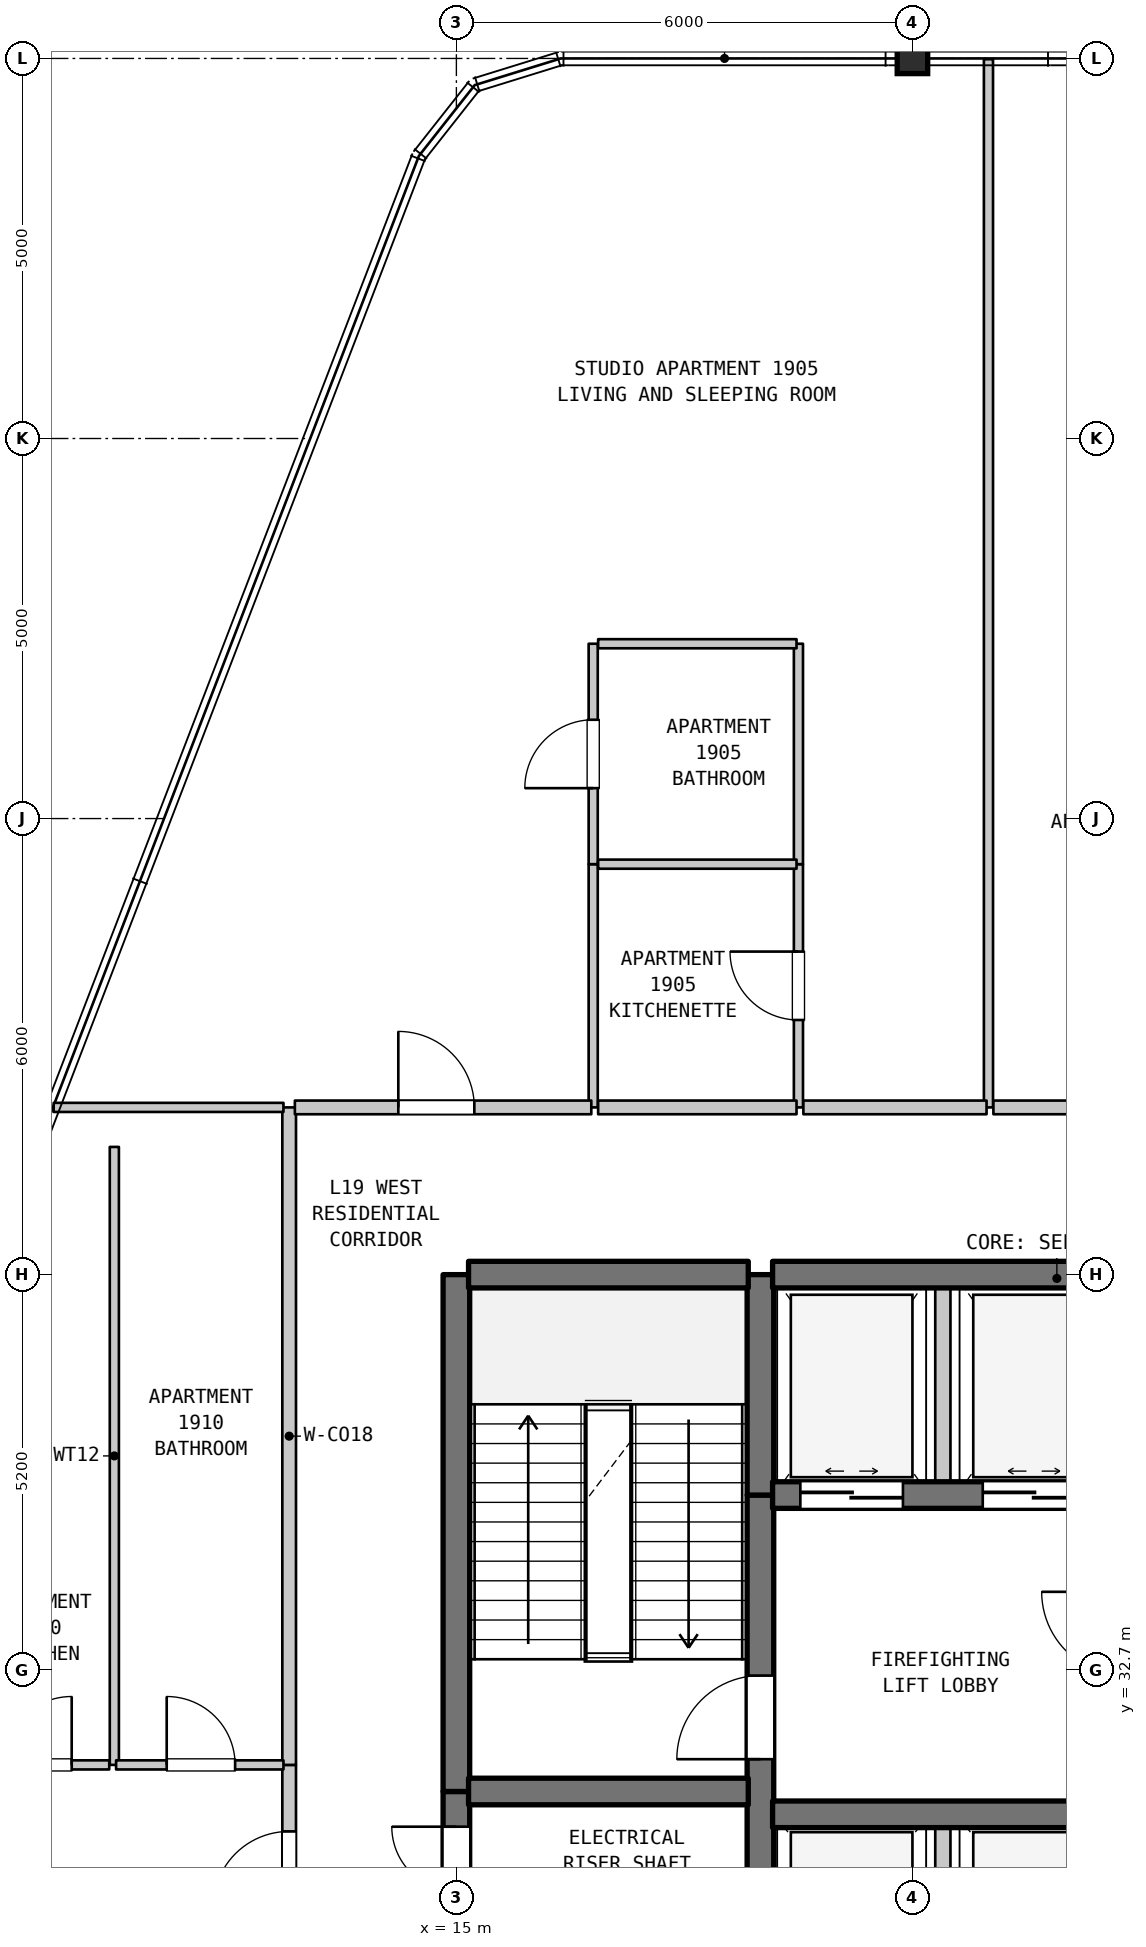
"""IFC4 building model, lengths in metres.
Left out: names, types, materials, properties, quantities, classifications, styles, units other than length and angle.
Written with IfcOpenShell. Run it as: python <this file> out.ifc"""

import sys

from ifc_helpers import new_model, si_unit, direction, frame, frame_2d, origin, origin_2d, place, context, subcontext, project, spatial, rectangle, i_section, extrude, element, fill, save


model = new_model("IFC4")
c1 = context("Model", 3, precision=1e-05, world=origin(), true_north=direction((0.0, 1.0)))
c2 = subcontext(c1, "Body", "Model", "MODEL_VIEW")
j1 = project(units=[si_unit("LENGTHUNIT", "METRE"), si_unit("PLANEANGLEUNIT", "RADIAN")], contexts=[c1])
p1 = place(None, origin())
s1 = spatial("IfcSite", under=j1, at=p1, CompositionType="ELEMENT")
p2 = place(p1, origin())
s2 = spatial("IfcBuilding", under=s1, at=p2, CompositionType="ELEMENT")
p3 = place(p2, frame((0.0, 0.0, 81.2)))
s3 = spatial("IfcBuildingStorey", under=s2, at=p3, CompositionType="ELEMENT", Elevation=81.2)
p4 = place(p3, frame((21.0, 53.9, 0.0), z_axis=(0.0, 0.0, 1.0), x_axis=(1.0, 0.0, 0.0)))
e1 = element("IfcColumn", 1, at=p4, inside=s3, PredefinedType="COLUMN", context=c2, shape_type="SweptSolid", body=[
    extrude(i_section(OverallWidth=0.401, OverallDepth=0.399, WebThickness=0.025, FlangeThickness=0.04, FilletRadius=0.015, at=origin_2d()), origin(), (0.0, 0.0, 1.0), 5.2),
])
p5 = place(p3, frame((10.5, 31.45, 0.0), z_axis=(0.0, 0.0, 1.0), x_axis=(0.0, 1.0, 0.0)))
e2 = element("IfcWall", 2, at=p5, inside=s3, PredefinedType="PARTITIONING", context=c2, shape_type="SweptSolid", body=[
    extrude(rectangle(XDim=8.13, YDim=0.12, at=frame_2d((4.065, 0.0))), origin(), (0.0, 0.0, 1.0), 4.885),
])
p6 = place(p3, frame((12.8, 28.7, 0.0), z_axis=(0.0, 0.0, 1.0), x_axis=(0.0, 1.0, 0.0)))
e3 = element("IfcWall", 3, at=p6, inside=s3, PredefinedType="STANDARD", context=c2, shape_type="SweptSolid", body=[
    extrude(rectangle(XDim=2.75, YDim=0.18, at=frame_2d((1.375, 0.0))), origin(), (0.0, 0.0, 1.0), 4.885),
])
p7 = place(p6, frame((0.875, 0.0, 0.0)))
e4 = element("IfcOpeningElement", 4, at=p7, cuts=e3, PredefinedType="OPENING", context=c2, shape_type="SweptSolid", body=[
    extrude(rectangle(XDim=1.0, YDim=2.15, at=frame_2d((0.5, 1.075))), frame((0.0, 0.1, 0.0), z_axis=(0.0, -1.0, 0.0), x_axis=(1.0, 0.0, 0.0)), (0.0, 0.0, 1.0), 0.2),
])
p8 = place(p3, frame((12.8, 31.45, 0.0), z_axis=(0.0, 0.0, 1.0), x_axis=(0.0, 1.0, 0.0)))
e5 = element("IfcWall", 5, at=p8, inside=s3, PredefinedType="STANDARD", context=c2, shape_type="SweptSolid", body=[
    extrude(rectangle(XDim=8.65, YDim=0.18, at=frame_2d((4.325, 0.0))), origin(), (0.0, 0.0, 1.0), 4.885),
])
p9 = place(p3, frame((15.0, 29.5, 0.0), z_axis=(0.0, 0.0, 1.0), x_axis=(0.0, 1.0, 0.0)))
e6 = element("IfcWall", 6, at=p9, inside=s3, PredefinedType="SHEAR", context=c2, shape_type="SweptSolid", body=[
    extrude(rectangle(XDim=1.6, YDim=0.35, at=frame_2d((0.8, 0.0))), origin(), (0.0, 0.0, 1.0), 4.885),
])
p10 = place(p9, frame((0.287, 0.0, 0.0)))
e7 = element("IfcOpeningElement", 7, at=p10, cuts=e6, PredefinedType="OPENING", context=c2, shape_type="SweptSolid", body=[
    extrude(rectangle(XDim=0.85, YDim=2.1, at=frame_2d((0.425, 1.05))), frame((0.0, 0.185, 0.0), z_axis=(0.0, -1.0, 0.0), x_axis=(1.0, 0.0, 0.0)), (0.0, 0.0, 1.0), 0.37),
])
p11 = place(p3, frame((15.0, 31.1, 0.0), z_axis=(0.0, 0.0, 1.0), x_axis=(0.0, 1.0, 0.0)))
e8 = element("IfcWall", 8, at=p11, inside=s3, PredefinedType="SHEAR", context=c2, shape_type="SweptSolid", body=[
    extrude(rectangle(XDim=6.8, YDim=0.35, at=frame_2d((3.4, 0.0))), origin(), (0.0, 0.0, 1.0), 4.885),
])
p12 = place(p3, frame((16.8, 40.1, 0.0), z_axis=(0.0, 0.0, 1.0), x_axis=(0.0, 1.0, 0.0)))
e9 = element("IfcWall", 9, at=p12, inside=s3, PredefinedType="PARTITIONING", context=c2, shape_type="SweptSolid", body=[
    extrude(rectangle(XDim=3.2, YDim=0.12, at=frame_2d((1.6, 0.0))), origin(), (0.0, 0.0, 1.0), 4.885),
])
p13 = place(p3, frame((16.8, 43.3, 0.0), z_axis=(0.0, 0.0, 1.0), x_axis=(0.0, 1.0, 0.0)))
e10 = element("IfcWall", 10, at=p13, inside=s3, PredefinedType="PARTITIONING", context=c2, shape_type="SweptSolid", body=[
    extrude(rectangle(XDim=2.9, YDim=0.12, at=frame_2d((1.45, 0.0))), origin(), (0.0, 0.0, 1.0), 4.885),
])
p14 = place(p13, frame((1.0, 0.0, 0.0)))
e11 = element("IfcOpeningElement", 11, at=p14, cuts=e10, PredefinedType="OPENING", context=c2, shape_type="SweptSolid", body=[
    extrude(rectangle(XDim=0.9, YDim=2.1, at=frame_2d((0.45, 1.05))), frame((0.0, 0.07, 0.0), z_axis=(0.0, -1.0, 0.0), x_axis=(1.0, 0.0, 0.0)), (0.0, 0.0, 1.0), 0.14),
])
p15 = place(p3, frame((19.0, 29.5, 0.0), z_axis=(0.0, 0.0, 1.0), x_axis=(0.0, 1.0, 0.0)))
e12 = element("IfcWall", 12, at=p15, inside=s3, PredefinedType="SHEAR", context=c2, shape_type="SweptSolid", body=[
    extrude(rectangle(XDim=5.5, YDim=0.35, at=frame_2d((2.75, 0.0))), origin(), (0.0, 0.0, 1.0), 4.885),
])
p16 = place(p15, frame((2.025, 0.0, 0.0)))
e13 = element("IfcOpeningElement", 13, at=p16, cuts=e12, PredefinedType="OPENING", context=c2, shape_type="SweptSolid", body=[
    extrude(rectangle(XDim=1.1, YDim=2.15, at=frame_2d((0.55, 1.075))), frame((0.0, 0.185, 0.0), z_axis=(0.0, -1.0, 0.0), x_axis=(1.0, 0.0, 0.0)), (0.0, 0.0, 1.0), 0.37),
])
p17 = place(p3, frame((19.0, 35.0, 0.0), z_axis=(0.0, 0.0, 1.0), x_axis=(0.0, 1.0, 0.0)))
e14 = element("IfcWall", 14, at=p17, inside=s3, PredefinedType="SHEAR", context=c2, shape_type="SweptSolid", body=[
    extrude(rectangle(XDim=2.9, YDim=0.35, at=frame_2d((1.45, 0.0))), origin(), (0.0, 0.0, 1.0), 4.885),
])
p18 = place(p3, frame((19.5, 40.1, 0.0), z_axis=(0.0, 0.0, 1.0), x_axis=(0.0, 1.0, 0.0)))
e15 = element("IfcWall", 15, at=p18, inside=s3, PredefinedType="PARTITIONING", context=c2, shape_type="SweptSolid", body=[
    extrude(rectangle(XDim=3.2, YDim=0.12, at=frame_2d((1.6, 0.0))), origin(), (0.0, 0.0, 1.0), 4.885),
])
p19 = place(p18, frame((1.15, 0.0, 0.0)))
e16 = element("IfcOpeningElement", 16, at=p19, cuts=e15, PredefinedType="OPENING", context=c2, shape_type="SweptSolid", body=[
    extrude(rectangle(XDim=0.9, YDim=2.15, at=frame_2d((0.45, 1.075))), frame((0.0, 0.07, 0.0), z_axis=(0.0, -1.0, 0.0), x_axis=(1.0, 0.0, 0.0)), (0.0, 0.0, 1.0), 0.14),
])
p20 = place(p3, frame((19.5, 43.3, 0.0), z_axis=(0.0, 0.0, 1.0), x_axis=(0.0, 1.0, 0.0)))
e17 = element("IfcWall", 17, at=p20, inside=s3, PredefinedType="PARTITIONING", context=c2, shape_type="SweptSolid", body=[
    extrude(rectangle(XDim=2.9, YDim=0.12, at=frame_2d((1.45, 0.0))), origin(), (0.0, 0.0, 1.0), 4.885),
])
p21 = place(p3, frame((21.4, 28.2, 0.0), z_axis=(0.0, 0.0, 1.0), x_axis=(0.0, 1.0, 0.0)))
e18 = element("IfcWall", 18, at=p21, inside=s3, PredefinedType="STANDARD", context=c2, shape_type="SweptSolid", body=[
    extrude(rectangle(XDim=2.6, YDim=0.2, at=frame_2d((1.3, 0.0))), origin(), (0.0, 0.0, 1.0), 4.885),
])
p22 = place(p3, frame((21.4, 35.0, 0.0), z_axis=(0.0, 0.0, 1.0), x_axis=(0.0, 1.0, 0.0)))
e19 = element("IfcWall", 19, at=p22, inside=s3, PredefinedType="STANDARD", context=c2, shape_type="SweptSolid", body=[
    extrude(rectangle(XDim=2.9, YDim=0.2, at=frame_2d((1.45, 0.0))), origin(), (0.0, 0.0, 1.0), 4.885),
])
p23 = place(p3, frame((22.0, 40.1, 0.0), z_axis=(0.0, 0.0, 1.0), x_axis=(0.0, 1.0, 0.0)))
e20 = element("IfcWall", 20, at=p23, inside=s3, PredefinedType="PARTITIONING", context=c2, shape_type="SweptSolid", body=[
    extrude(rectangle(XDim=13.79, YDim=0.12, at=frame_2d((6.895, 0.0))), origin(), (0.0, 0.0, 1.0), 4.885),
])
p24 = place(p3, frame((19.16, 30.8, 0.0), z_axis=(0.0, 0.0, 1.0), x_axis=(1.0, 0.0, 0.0)))
e21 = element("IfcWall", 21, at=p24, inside=s3, PredefinedType="SHEAR", context=c2, shape_type="SweptSolid", body=[
    extrude(rectangle(XDim=4.48, YDim=0.35, at=frame_2d((2.24, 0.0))), origin(), (0.0, 0.0, 1.0), 4.885),
])
p25 = place(p3, frame((15.16, 31.1, 0.0), z_axis=(0.0, 0.0, 1.0), x_axis=(1.0, 0.0, 0.0)))
e22 = element("IfcWall", 22, at=p25, inside=s3, PredefinedType="SHEAR", context=c2, shape_type="SweptSolid", body=[
    extrude(rectangle(XDim=3.68, YDim=0.35, at=frame_2d((1.84, 0.0))), origin(), (0.0, 0.0, 1.0), 4.885),
])
p26 = place(p3, frame((8.545, 31.45, 0.0), z_axis=(0.0, 0.0, 1.0), x_axis=(1.0, 0.0, 0.0)))
e23 = element("IfcWall", 23, at=p26, inside=s3, PredefinedType="PARTITIONING", context=c2, shape_type="SweptSolid", body=[
    extrude(rectangle(XDim=1.888, YDim=0.12, at=frame_2d((0.944, 0.0))), origin(), (0.0, 0.0, 1.0), 4.885),
])
p27 = place(p26, frame((0.494, 0.0, 0.0)))
e24 = element("IfcOpeningElement", 24, at=p27, cuts=e23, PredefinedType="OPENING", context=c2, shape_type="SweptSolid", body=[
    extrude(rectangle(XDim=0.9, YDim=2.15, at=frame_2d((0.45, 1.075))), frame((0.0, 0.07, 0.0), z_axis=(0.0, -1.0, 0.0), x_axis=(1.0, 0.0, 0.0)), (0.0, 0.0, 1.0), 0.14),
])
p28 = place(p3, frame((10.523, 31.45, 0.0), z_axis=(0.0, 0.0, 1.0), x_axis=(1.0, 0.0, 0.0)))
e25 = element("IfcWall", 25, at=p28, inside=s3, PredefinedType="PARTITIONING", context=c2, shape_type="SweptSolid", body=[
    extrude(rectangle(XDim=2.202, YDim=0.12, at=frame_2d((1.101, 0.0))), origin(), (0.0, 0.0, 1.0), 4.885),
])
p29 = place(p28, frame((0.666, 0.0, 0.0)))
e26 = element("IfcOpeningElement", 26, at=p29, cuts=e25, PredefinedType="OPENING", context=c2, shape_type="SweptSolid", body=[
    extrude(rectangle(XDim=0.9, YDim=2.1, at=frame_2d((0.45, 1.05))), frame((0.0, 0.07, 0.0), z_axis=(0.0, -1.0, 0.0), x_axis=(1.0, 0.0, 0.0)), (0.0, 0.0, 1.0), 0.14),
])
p30 = place(p3, frame((19.16, 35.0, 0.0), z_axis=(0.0, 0.0, 1.0), x_axis=(1.0, 0.0, 0.0)))
e27 = element("IfcWall", 27, at=p30, inside=s3, PredefinedType="SHEAR", context=c2, shape_type="SweptSolid", body=[
    extrude(rectangle(XDim=11.48, YDim=0.35, at=frame_2d((5.74, 0.0))), origin(), (0.0, 0.0, 1.0), 4.885),
])
p31 = place(p30, frame((0.365, 0.0, 0.0)))
e28 = element("IfcOpeningElement", 28, at=p31, cuts=e27, PredefinedType="OPENING", context=c2, shape_type="SweptSolid", body=[
    extrude(rectangle(XDim=1.35, YDim=2.2, at=frame_2d((0.675, 1.1))), frame((0.0, 0.185, 0.0), z_axis=(0.0, -1.0, 0.0), x_axis=(1.0, 0.0, 0.0)), (0.0, 0.0, 1.0), 0.37),
])
p32 = place(p30, frame((2.765, 0.0, 0.0)))
e29 = element("IfcOpeningElement", 29, at=p32, cuts=e27, PredefinedType="OPENING", context=c2, shape_type="SweptSolid", body=[
    extrude(rectangle(XDim=1.35, YDim=2.2, at=frame_2d((0.675, 1.1))), frame((0.0, 0.185, 0.0), z_axis=(0.0, -1.0, 0.0), x_axis=(1.0, 0.0, 0.0)), (0.0, 0.0, 1.0), 0.37),
])
p33 = place(p30, frame((4.915, 0.0, 0.0)))
e30 = element("IfcOpeningElement", 30, at=p33, cuts=e27, PredefinedType="OPENING", context=c2, shape_type="SweptSolid", body=[
    extrude(rectangle(XDim=1.2, YDim=2.2, at=frame_2d((0.6, 1.1))), frame((0.0, 0.185, 0.0), z_axis=(0.0, -1.0, 0.0), x_axis=(1.0, 0.0, 0.0)), (0.0, 0.0, 1.0), 0.37),
])
p34 = place(p30, frame((6.665, 0.0, 0.0)))
e31 = element("IfcOpeningElement", 31, at=p34, cuts=e27, PredefinedType="OPENING", context=c2, shape_type="SweptSolid", body=[
    extrude(rectangle(XDim=1.2, YDim=2.2, at=frame_2d((0.6, 1.1))), frame((0.0, 0.185, 0.0), z_axis=(0.0, -1.0, 0.0), x_axis=(1.0, 0.0, 0.0)), (0.0, 0.0, 1.0), 0.37),
])
p35 = place(p30, frame((8.415, 0.0, 0.0)))
e32 = element("IfcOpeningElement", 32, at=p35, cuts=e27, PredefinedType="OPENING", context=c2, shape_type="SweptSolid", body=[
    extrude(rectangle(XDim=1.2, YDim=2.2, at=frame_2d((0.6, 1.1))), frame((0.0, 0.185, 0.0), z_axis=(0.0, -1.0, 0.0), x_axis=(1.0, 0.0, 0.0)), (0.0, 0.0, 1.0), 0.37),
])
p36 = place(p30, frame((10.16, 0.0, 0.0)))
e33 = element("IfcOpeningElement", 33, at=p36, cuts=e27, PredefinedType="OPENING", context=c2, shape_type="SweptSolid", body=[
    extrude(rectangle(XDim=1.2, YDim=2.2, at=frame_2d((0.6, 1.1))), frame((0.0, 0.185, 0.0), z_axis=(0.0, -1.0, 0.0), x_axis=(1.0, 0.0, 0.0)), (0.0, 0.0, 1.0), 0.37),
])
p37 = place(p3, frame((15.16, 37.9, 0.0), z_axis=(0.0, 0.0, 1.0), x_axis=(1.0, 0.0, 0.0)))
e34 = element("IfcWall", 34, at=p37, inside=s3, PredefinedType="SHEAR", context=c2, shape_type="SweptSolid", body=[
    extrude(rectangle(XDim=3.68, YDim=0.35, at=frame_2d((1.84, 0.0))), origin(), (0.0, 0.0, 1.0), 4.885),
])
p38 = place(p3, frame((19.16, 37.9, 0.0), z_axis=(0.0, 0.0, 1.0), x_axis=(1.0, 0.0, 0.0)))
e35 = element("IfcWall", 35, at=p38, inside=s3, PredefinedType="SHEAR", context=c2, shape_type="SweptSolid", body=[
    extrude(rectangle(XDim=11.48, YDim=0.35, at=frame_2d((5.74, 0.0))), origin(), (0.0, 0.0, 1.0), 4.885),
])
p39 = place(p3, frame((9.702, 40.1, 0.0), z_axis=(0.0, 0.0, 1.0), x_axis=(1.0, 0.0, 0.0)))
e36 = element("IfcWall", 36, at=p39, inside=s3, PredefinedType="PARTITIONING", context=c2, shape_type="SweptSolid", body=[
    extrude(rectangle(XDim=3.023, YDim=0.12, at=frame_2d((1.512, 0.0))), origin(), (0.0, 0.0, 1.0), 4.885),
])
p40 = place(p3, frame((12.875, 40.1, 0.0), z_axis=(0.0, 0.0, 1.0), x_axis=(1.0, 0.0, 0.0)))
e37 = element("IfcWall", 37, at=p40, inside=s3, PredefinedType="STANDARD", context=c2, shape_type="SweptSolid", body=[
    extrude(rectangle(XDim=3.9, YDim=0.18, at=frame_2d((1.95, 0.0))), origin(), (0.0, 0.0, 1.0), 4.885),
])
p41 = place(p40, frame((1.361, 0.0, 0.0)))
e38 = element("IfcOpeningElement", 38, at=p41, cuts=e37, PredefinedType="OPENING", context=c2, shape_type="SweptSolid", body=[
    extrude(rectangle(XDim=1.0, YDim=2.15, at=frame_2d((0.5, 1.075))), frame((0.0, 0.1, 0.0), z_axis=(0.0, -1.0, 0.0), x_axis=(1.0, 0.0, 0.0)), (0.0, 0.0, 1.0), 0.2),
])
p42 = place(p3, frame((16.865, 40.1, 0.0), z_axis=(0.0, 0.0, 1.0), x_axis=(1.0, 0.0, 0.0)))
e39 = element("IfcWall", 39, at=p42, inside=s3, PredefinedType="STANDARD", context=c2, shape_type="SweptSolid", body=[
    extrude(rectangle(XDim=2.61, YDim=0.18, at=frame_2d((1.305, 0.0))), origin(), (0.0, 0.0, 1.0), 4.885),
])
p43 = place(p3, frame((19.565, 40.1, 0.0), z_axis=(0.0, 0.0, 1.0), x_axis=(1.0, 0.0, 0.0)))
e40 = element("IfcWall", 40, at=p43, inside=s3, PredefinedType="STANDARD", context=c2, shape_type="SweptSolid", body=[
    extrude(rectangle(XDim=2.41, YDim=0.18, at=frame_2d((1.205, 0.0))), origin(), (0.0, 0.0, 1.0), 4.885),
])
p44 = place(p3, frame((22.065, 40.1, 0.0), z_axis=(0.0, 0.0, 1.0), x_axis=(1.0, 0.0, 0.0)))
e41 = element("IfcWall", 41, at=p44, inside=s3, PredefinedType="STANDARD", context=c2, shape_type="SweptSolid", body=[
    extrude(rectangle(XDim=4.36, YDim=0.18, at=frame_2d((2.18, 0.0))), origin(), (0.0, 0.0, 1.0), 4.885),
])
p45 = place(p44, frame((1.61, 0.0, 0.0)))
e42 = element("IfcOpeningElement", 42, at=p45, cuts=e41, PredefinedType="OPENING", context=c2, shape_type="SweptSolid", body=[
    extrude(rectangle(XDim=1.0, YDim=2.15, at=frame_2d((0.5, 1.075))), frame((0.0, 0.1, 0.0), z_axis=(0.0, -1.0, 0.0), x_axis=(1.0, 0.0, 0.0)), (0.0, 0.0, 1.0), 0.2),
])
for number, where, z_axis, x_axis in (
    (43, (16.865, 43.3, 0.0), (0.0, 0.0, 1.0), (1.0, 0.0, 0.0)),
    (44, (16.865, 46.2, 0.0), (0.0, 0.0, 1.0), (1.0, 0.0, 0.0)),
):
    element("IfcWall", number, at=place(p3, frame(where, z_axis=z_axis, x_axis=x_axis)), inside=s3, PredefinedType="PARTITIONING", context=c2, shape_type="SweptSolid", body=[
        extrude(rectangle(XDim=2.61, YDim=0.12, at=frame_2d((1.305, 0.0))), origin(), (0.0, 0.0, 1.0), 4.885),
    ])
p46 = place(p7, origin())
e45 = element("IfcDoor", 45, at=p46, inside=s3, OperationType="SINGLE_SWING_LEFT", PredefinedType="DOOR", context=c2, shape_type="SweptSolid", body=[
    extrude(rectangle(XDim=1.0, YDim=2.15, at=frame_2d((0.5, 1.075))), frame((0.0, 0.025, 0.0), z_axis=(0.0, -1.0, 0.0), x_axis=(1.0, 0.0, 0.0)), (0.0, 0.0, 1.0), 0.05),
])
fill(e4, e45)
p47 = place(p10, origin())
e46 = element("IfcDoor", 46, at=p47, inside=s3, OperationType="SINGLE_SWING_RIGHT", PredefinedType="DOOR", context=c2, shape_type="SweptSolid", body=[
    extrude(rectangle(XDim=0.85, YDim=2.1, at=frame_2d((0.425, 1.05))), frame((0.0, 0.025, 0.0), z_axis=(0.0, -1.0, 0.0), x_axis=(1.0, 0.0, 0.0)), (0.0, 0.0, 1.0), 0.05),
])
fill(e7, e46)
p48 = place(p14, origin())
e47 = element("IfcDoor", 47, at=p48, inside=s3, OperationType="SINGLE_SWING_LEFT", PredefinedType="DOOR", context=c2, shape_type="SweptSolid", body=[
    extrude(rectangle(XDim=0.9, YDim=2.1, at=frame_2d((0.45, 1.05))), frame((0.0, 0.025, 0.0), z_axis=(0.0, -1.0, 0.0), x_axis=(1.0, 0.0, 0.0)), (0.0, 0.0, 1.0), 0.05),
])
fill(e11, e47)
p49 = place(p16, origin())
e48 = element("IfcDoor", 48, at=p49, inside=s3, OperationType="SINGLE_SWING_LEFT", PredefinedType="DOOR", context=c2, shape_type="SweptSolid", body=[
    extrude(rectangle(XDim=1.1, YDim=2.15, at=frame_2d((0.55, 1.075))), frame((0.0, 0.025, 0.0), z_axis=(0.0, -1.0, 0.0), x_axis=(1.0, 0.0, 0.0)), (0.0, 0.0, 1.0), 0.05),
])
fill(e13, e48)
p50 = place(p19, origin())
e49 = element("IfcDoor", 49, at=p50, inside=s3, OperationType="SINGLE_SWING_RIGHT", PredefinedType="DOOR", context=c2, shape_type="SweptSolid", body=[
    extrude(rectangle(XDim=0.9, YDim=2.15, at=frame_2d((0.45, 1.075))), frame((0.0, 0.025, 0.0), z_axis=(0.0, -1.0, 0.0), x_axis=(1.0, 0.0, 0.0)), (0.0, 0.0, 1.0), 0.05),
])
fill(e16, e49)
p51 = place(p27, origin())
e50 = element("IfcDoor", 50, at=p51, inside=s3, OperationType="SINGLE_SWING_RIGHT", PredefinedType="DOOR", context=c2, shape_type="SweptSolid", body=[
    extrude(rectangle(XDim=0.9, YDim=2.15, at=frame_2d((0.45, 1.075))), frame((0.0, 0.025, 0.0), z_axis=(0.0, -1.0, 0.0), x_axis=(1.0, 0.0, 0.0)), (0.0, 0.0, 1.0), 0.05),
])
fill(e24, e50)
p52 = place(p29, origin())
e51 = element("IfcDoor", 51, at=p52, inside=s3, OperationType="SINGLE_SWING_LEFT", PredefinedType="DOOR", context=c2, shape_type="SweptSolid", body=[
    extrude(rectangle(XDim=0.9, YDim=2.1, at=frame_2d((0.45, 1.05))), frame((0.0, 0.025, 0.0), z_axis=(0.0, -1.0, 0.0), x_axis=(1.0, 0.0, 0.0)), (0.0, 0.0, 1.0), 0.05),
])
fill(e26, e51)
p53 = place(p31, origin())
e52 = element("IfcDoor", 52, at=p53, inside=s3, OperationType="DOUBLE_DOOR_SLIDING", PredefinedType="DOOR", context=c2, shape_type="SweptSolid", body=[
    extrude(rectangle(XDim=1.35, YDim=2.2, at=frame_2d((0.675, 1.1))), frame((0.0, 0.025, 0.0), z_axis=(0.0, -1.0, 0.0), x_axis=(1.0, 0.0, 0.0)), (0.0, 0.0, 1.0), 0.05),
])
fill(e28, e52)
p54 = place(p32, origin())
e53 = element("IfcDoor", 53, at=p54, inside=s3, OperationType="DOUBLE_DOOR_SLIDING", PredefinedType="DOOR", context=c2, shape_type="SweptSolid", body=[
    extrude(rectangle(XDim=1.35, YDim=2.2, at=frame_2d((0.675, 1.1))), frame((0.0, 0.025, 0.0), z_axis=(0.0, -1.0, 0.0), x_axis=(1.0, 0.0, 0.0)), (0.0, 0.0, 1.0), 0.05),
])
fill(e29, e53)
p55 = place(p41, origin())
e54 = element("IfcDoor", 54, at=p55, inside=s3, OperationType="SINGLE_SWING_LEFT", PredefinedType="DOOR", context=c2, shape_type="SweptSolid", body=[
    extrude(rectangle(XDim=1.0, YDim=2.15, at=frame_2d((0.5, 1.075))), frame((0.0, 0.025, 0.0), z_axis=(0.0, -1.0, 0.0), x_axis=(1.0, 0.0, 0.0)), (0.0, 0.0, 1.0), 0.05),
])
fill(e38, e54)
save(model, sys.argv[1])
